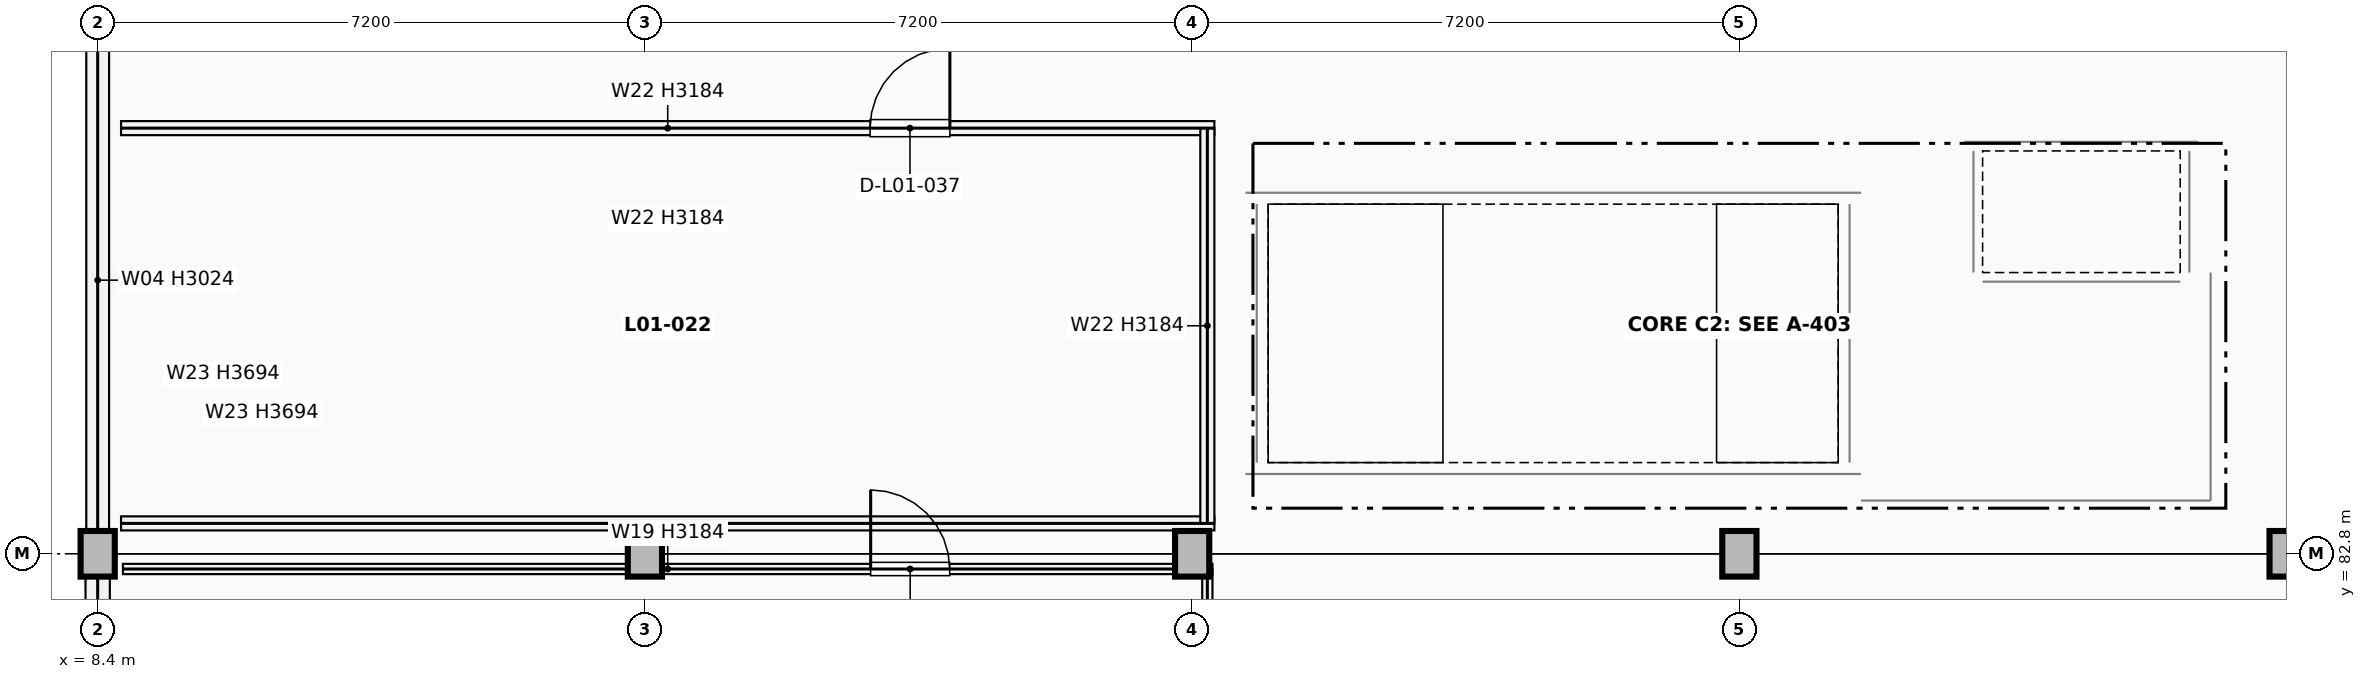
"""IFC4 building model, lengths in metres.
Left out: names, types, materials, properties, quantities, classifications, styles, units other than length and angle.
Written with IfcOpenShell. Run it as: python <this file> out.ifc"""

import sys

from ifc_helpers import new_model, si_unit, direction, frame, frame_2d, origin, origin_2d, place, context, subcontext, project, spatial, rectangle, extrude, element, fill, save


model = new_model("IFC4")
c1 = context("Model", 3, precision=1e-05, world=origin(), true_north=direction((0.0, 1.0)))
c2 = subcontext(c1, "Body", "Model", "MODEL_VIEW")
j1 = project(units=[si_unit("LENGTHUNIT", "METRE"), si_unit("PLANEANGLEUNIT", "RADIAN")], contexts=[c1])
p1 = place(None, origin())
s1 = spatial("IfcSite", under=j1, at=p1, CompositionType="ELEMENT")
p2 = place(p1, origin())
s2 = spatial("IfcBuilding", under=s1, at=p2, CompositionType="ELEMENT")
p3 = place(p2, frame((0.0, 0.0, 5.1)))
s3 = spatial("IfcBuildingStorey", under=s2, at=p3, CompositionType="ELEMENT", Elevation=5.1)
for number, where, z_axis, x_axis in (
    (1, (8.4, 82.8, 0.0), (0.0, 0.0, 1.0), (1.0, 0.0, 0.0)),
    (2, (15.6, 82.8, 0.0), (0.0, 0.0, 1.0), (1.0, 0.0, 0.0)),
    (3, (22.8, 82.8, 0.0), (0.0, 0.0, 1.0), (1.0, 0.0, 0.0)),
    (4, (30.0, 82.8, 0.0), (0.0, 0.0, 1.0), (1.0, 0.0, 0.0)),
    (5, (37.2, 82.8, 0.0), (0.0, 0.0, 1.0), (1.0, 0.0, 0.0)),
):
    element("IfcColumn", number, at=place(p3, frame(where, z_axis=z_axis, x_axis=x_axis)), inside=s3, PredefinedType="COLUMN", context=c2, shape_type="SweptSolid", body=[
        extrude(rectangle(XDim=0.45, YDim=0.6, at=origin_2d()), origin(), (0.0, 0.0, 1.0), 4.42),
    ])
p4 = place(p3, frame((8.4, 79.502, 0.0), z_axis=(0.0, 0.0, 1.0), x_axis=(0.0, 1.0, 0.0)))
e6 = element("IfcWall", 6, at=p4, inside=s3, PredefinedType="SOLIDWALL", context=c2, shape_type="SweptSolid", body=[
    extrude(rectangle(XDim=2.996, YDim=0.32, at=frame_2d((1.498, 0.0))), origin(), (0.0, 0.0, 1.0), 3.024),
])
p5 = place(p3, frame((8.4, 83.102, 0.0), z_axis=(0.0, 0.0, 1.0), x_axis=(0.0, 1.0, 0.0)))
e7 = element("IfcWall", 7, at=p5, inside=s3, PredefinedType="SOLIDWALL", context=c2, shape_type="SweptSolid", body=[
    extrude(rectangle(XDim=6.596, YDim=0.3, at=frame_2d((3.298, 0.0))), origin(), (0.0, 0.0, 1.0), 3.024),
])
p6 = place(p3, frame((23.65, 84.0, 0.0), z_axis=(0.0, 0.0, 1.0), x_axis=(0.0, 1.0, 0.0)))
e8 = element("IfcWall", 8, at=p6, inside=s3, PredefinedType="SHEAR", context=c2, shape_type="SweptSolid", body=[
    extrude(rectangle(XDim=3.4, YDim=0.3, at=frame_2d((1.7, 0.0))), origin(), (0.0, 0.0, 1.0), 4.42),
])
for number, where, z_axis, x_axis in (
    (9, (23.5, 83.85, 0.0), (0.0, 0.0, 1.0), (1.0, 0.0, 0.0)),
    (10, (23.5, 87.55, 0.0), (0.0, 0.0, 1.0), (1.0, 0.0, 0.0)),
):
    element("IfcWall", number, at=place(p3, frame(where, z_axis=z_axis, x_axis=x_axis)), inside=s3, PredefinedType="SHEAR", context=c2, shape_type="SweptSolid", body=[
        extrude(rectangle(XDim=8.1, YDim=0.3, at=frame_2d((4.05, 0.0))), origin(), (0.0, 0.0, 1.0), 4.42),
    ])
p7 = place(p3, frame((31.45, 84.0, 0.0), z_axis=(0.0, 0.0, 1.0), x_axis=(0.0, 1.0, 0.0)))
e11 = element("IfcWall", 11, at=p7, inside=s3, PredefinedType="SHEAR", context=c2, shape_type="SweptSolid", body=[
    extrude(rectangle(XDim=3.4, YDim=0.3, at=frame_2d((1.7, 0.0))), origin(), (0.0, 0.0, 1.0), 4.42),
])
p8 = place(p7, frame((0.65, 0.0, 0.0)))
e12 = element("IfcOpeningElement", 12, at=p8, cuts=e11, PredefinedType="OPENING", context=c2, shape_type="SweptSolid", body=[
    extrude(rectangle(XDim=1.2, YDim=2.2, at=frame_2d((0.6, 1.1))), frame((0.0, 0.16, 0.0), z_axis=(0.0, -1.0, 0.0), x_axis=(1.0, 0.0, 0.0)), (0.0, 0.0, 1.0), 0.32),
])
for number, where, z_axis, x_axis in (
    (13, (33.08, 86.5, 0.0), (0.0, 0.0, 1.0), (0.0, 1.0, 0.0)),
    (14, (35.92, 86.5, 0.0), (0.0, 0.0, 1.0), (0.0, 1.0, 0.0)),
):
    element("IfcWall", number, at=place(p3, frame(where, z_axis=z_axis, x_axis=x_axis)), inside=s3, PredefinedType="SHEAR", context=c2, shape_type="SweptSolid", body=[
        extrude(rectangle(XDim=1.6, YDim=0.24, at=frame_2d((0.8, 0.0))), origin(), (0.0, 0.0, 1.0), 4.42),
    ])
p9 = place(p3, frame((32.96, 88.22, 0.0), z_axis=(0.0, 0.0, 1.0), x_axis=(1.0, 0.0, 0.0)))
e15 = element("IfcWall", 15, at=p9, inside=s3, PredefinedType="SHEAR", context=c2, shape_type="SweptSolid", body=[
    extrude(rectangle(XDim=3.08, YDim=0.24, at=frame_2d((1.54, 0.0))), origin(), (0.0, 0.0, 1.0), 4.42),
])
p10 = place(p3, frame((33.2, 86.38, 0.0), z_axis=(0.0, 0.0, 1.0), x_axis=(1.0, 0.0, 0.0)))
e16 = element("IfcWall", 16, at=p10, inside=s3, PredefinedType="SHEAR", context=c2, shape_type="SweptSolid", body=[
    extrude(rectangle(XDim=2.6, YDim=0.24, at=frame_2d((1.3, 0.0))), origin(), (0.0, 0.0, 1.0), 4.42),
])
p11 = place(p10, frame((0.8, 0.0, 0.0)))
e17 = element("IfcOpeningElement", 17, at=p11, cuts=e16, PredefinedType="OPENING", context=c2, shape_type="SweptSolid", body=[
    extrude(rectangle(XDim=1.0, YDim=2.15, at=frame_2d((0.5, 1.075))), frame((0.0, 0.13, 0.0), z_axis=(0.0, -1.0, 0.0), x_axis=(1.0, 0.0, 0.0)), (0.0, 0.0, 1.0), 0.26),
])
p12 = place(p3, frame((36.2, 83.5, 0.0), z_axis=(0.0, 0.0, 1.0), x_axis=(0.0, 1.0, 0.0)))
e18 = element("IfcWall", 18, at=p12, inside=s3, PredefinedType="PARTITIONING", context=c2, shape_type="SweptSolid", body=[
    extrude(rectangle(XDim=3.0, YDim=0.2, at=frame_2d((1.5, 0.0))), origin(), (0.0, 0.0, 1.0), 3.694),
])
p13 = place(p12, frame((0.775, 0.0, 0.0)))
e19 = element("IfcOpeningElement", 19, at=p13, cuts=e18, PredefinedType="OPENING", context=c2, shape_type="SweptSolid", body=[
    extrude(rectangle(XDim=1.45, YDim=2.2, at=frame_2d((0.725, 1.1))), frame((0.0, 0.11, 0.0), z_axis=(0.0, -1.0, 0.0), x_axis=(1.0, 0.0, 0.0)), (0.0, 0.0, 1.0), 0.22),
])
p14 = place(p3, frame((31.6, 83.5, 0.0), z_axis=(0.0, 0.0, 1.0), x_axis=(1.0, 0.0, 0.0)))
e20 = element("IfcWall", 20, at=p14, inside=s3, PredefinedType="PARTITIONING", context=c2, shape_type="SweptSolid", body=[
    extrude(rectangle(XDim=4.6, YDim=0.2, at=frame_2d((2.3, 0.0))), origin(), (0.0, 0.0, 1.0), 3.694),
])
p15 = place(p3, frame((8.732, 82.6, 0.0), z_axis=(0.0, 0.0, 1.0), x_axis=(1.0, 0.0, 0.0)))
e21 = element("IfcWall", 21, at=p15, inside=s3, PredefinedType="PARTITIONING", context=c2, shape_type="SweptSolid", body=[
    extrude(rectangle(XDim=14.335, YDim=0.135, at=frame_2d((7.167, 0.0))), origin(), (0.0, 0.0, 1.0), 3.184),
])
p16 = place(p15, frame((9.837, 0.0, 0.0)))
e22 = element("IfcOpeningElement", 22, at=p16, cuts=e21, PredefinedType="OPENING", context=c2, shape_type="SweptSolid", body=[
    extrude(rectangle(XDim=1.04, YDim=2.12, at=frame_2d((0.52, 1.06))), frame((0.0, 0.078, 0.0), z_axis=(0.0, -1.0, 0.0), x_axis=(1.0, 0.0, 0.0)), (0.0, 0.0, 1.0), 0.155),
])
p17 = place(p3, frame((23.0, 79.6, 0.0), z_axis=(0.0, 0.0, 1.0), x_axis=(0.0, 1.0, 0.0)))
e23 = element("IfcWall", 23, at=p17, inside=s3, PredefinedType="PARTITIONING", context=c2, shape_type="SweptSolid", body=[
    extrude(rectangle(XDim=3.0, YDim=0.135, at=frame_2d((1.5, 0.0))), origin(), (0.0, 0.0, 1.0), 3.184),
])
p18 = place(p3, frame((8.708, 83.2, 0.0), z_axis=(0.0, 0.0, 1.0), x_axis=(1.0, 0.0, 0.0)))
e24 = element("IfcWall", 24, at=p18, inside=s3, PredefinedType="PARTITIONING", context=c2, shape_type="SweptSolid", body=[
    extrude(rectangle(XDim=14.385, YDim=0.185, at=frame_2d((7.192, 0.0))), origin(), (0.0, 0.0, 1.0), 3.184),
])
p19 = place(p3, frame((8.708, 88.4, 0.0), z_axis=(0.0, 0.0, 1.0), x_axis=(1.0, 0.0, 0.0)))
e25 = element("IfcWall", 25, at=p19, inside=s3, PredefinedType="PARTITIONING", context=c2, shape_type="SweptSolid", body=[
    extrude(rectangle(XDim=14.385, YDim=0.185, at=frame_2d((7.192, 0.0))), origin(), (0.0, 0.0, 1.0), 3.184),
])
p20 = place(p19, frame((9.855, 0.0, 0.0)))
e26 = element("IfcOpeningElement", 26, at=p20, cuts=e25, PredefinedType="OPENING", context=c2, shape_type="SweptSolid", body=[
    extrude(rectangle(XDim=1.05, YDim=2.15, at=frame_2d((0.525, 1.075))), frame((0.0, 0.103, 0.0), z_axis=(0.0, -1.0, 0.0), x_axis=(1.0, 0.0, 0.0)), (0.0, 0.0, 1.0), 0.205),
])
p21 = place(p3, frame((23.0, 83.2, 0.0), z_axis=(0.0, 0.0, 1.0), x_axis=(0.0, 1.0, 0.0)))
e27 = element("IfcWall", 27, at=p21, inside=s3, PredefinedType="PARTITIONING", context=c2, shape_type="SweptSolid", body=[
    extrude(rectangle(XDim=5.2, YDim=0.185, at=frame_2d((2.6, 0.0))), origin(), (0.0, 0.0, 1.0), 3.184),
])
p22 = place(p8, origin())
e28 = element("IfcDoor", 28, at=p22, inside=s3, OperationType="SINGLE_SWING_LEFT", PredefinedType="DOOR", context=c2, shape_type="SweptSolid", body=[
    extrude(rectangle(XDim=1.2, YDim=2.2, at=frame_2d((0.6, 1.1))), frame((0.0, 0.025, 0.0), z_axis=(0.0, -1.0, 0.0), x_axis=(1.0, 0.0, 0.0)), (0.0, 0.0, 1.0), 0.05),
])
fill(e12, e28)
p23 = place(p11, origin())
e29 = element("IfcDoor", 29, at=p23, inside=s3, OperationType="DOUBLE_DOOR_SLIDING", PredefinedType="DOOR", context=c2, shape_type="SweptSolid", body=[
    extrude(rectangle(XDim=1.0, YDim=2.15, at=frame_2d((0.5, 1.075))), frame((0.0, 0.025, 0.0), z_axis=(0.0, -1.0, 0.0), x_axis=(1.0, 0.0, 0.0)), (0.0, 0.0, 1.0), 0.05),
])
fill(e17, e29)
p24 = place(p13, frame((1.45, 0.0, 0.0), z_axis=(0.0, 0.0, 1.0), x_axis=(-1.0, 0.0, 0.0)))
e30 = element("IfcDoor", 30, at=p24, inside=s3, OperationType="DOUBLE_DOOR_SINGLE_SWING", PredefinedType="DOOR", context=c2, shape_type="SweptSolid", body=[
    extrude(rectangle(XDim=1.45, YDim=2.2, at=frame_2d((0.725, 1.1))), frame((0.0, 0.025, 0.0), z_axis=(0.0, -1.0, 0.0), x_axis=(1.0, 0.0, 0.0)), (0.0, 0.0, 1.0), 0.05),
])
fill(e19, e30)
p25 = place(p16, origin())
e31 = element("IfcDoor", 31, at=p25, inside=s3, OperationType="SINGLE_SWING_LEFT", PredefinedType="DOOR", context=c2, shape_type="SweptSolid", body=[
    extrude(rectangle(XDim=1.04, YDim=2.12, at=frame_2d((0.52, 1.06))), frame((0.0, 0.025, 0.0), z_axis=(0.0, -1.0, 0.0), x_axis=(1.0, 0.0, 0.0)), (0.0, 0.0, 1.0), 0.05),
])
fill(e22, e31)
p26 = place(p20, origin())
e32 = element("IfcDoor", 32, at=p26, inside=s3, OperationType="SINGLE_SWING_RIGHT", PredefinedType="DOOR", context=c2, shape_type="SweptSolid", body=[
    extrude(rectangle(XDim=1.05, YDim=2.15, at=frame_2d((0.525, 1.075))), frame((0.0, 0.025, 0.0), z_axis=(0.0, -1.0, 0.0), x_axis=(1.0, 0.0, 0.0)), (0.0, 0.0, 1.0), 0.05),
])
fill(e26, e32)
save(model, sys.argv[1])
